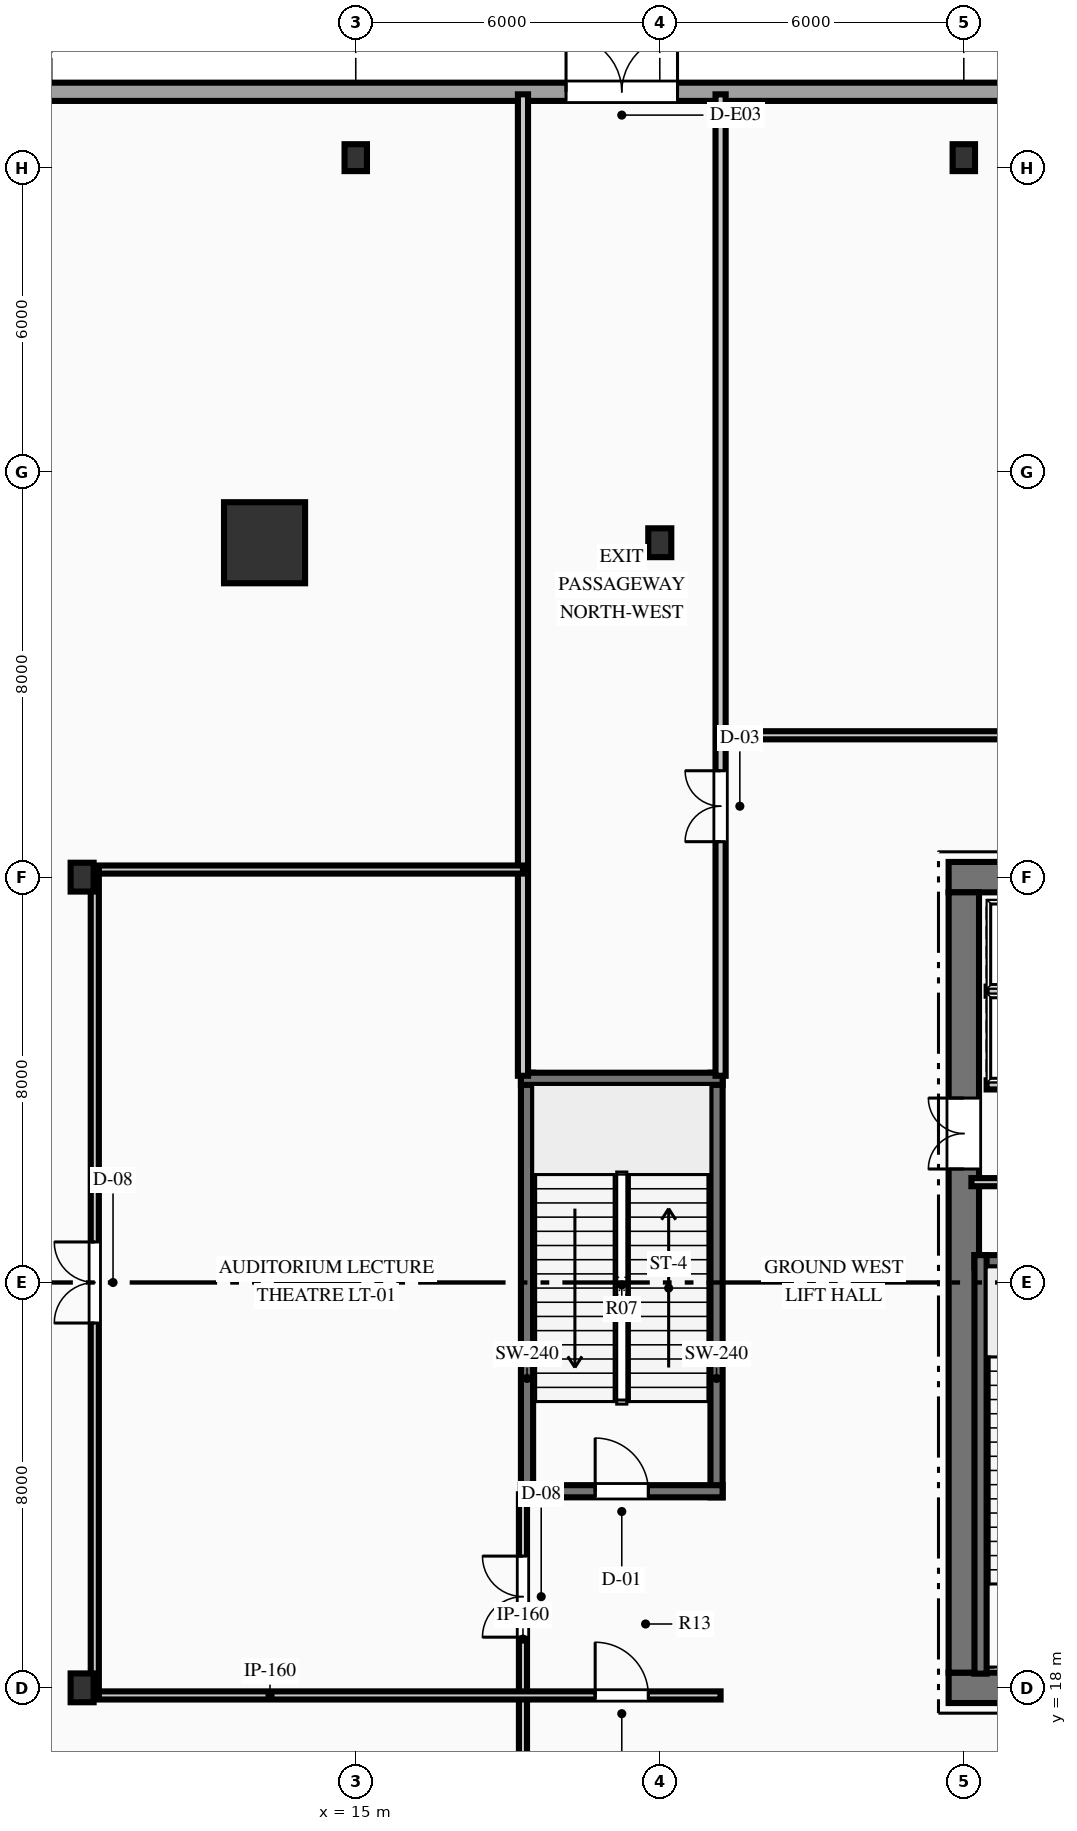
"""IFC4 building model, lengths in metres.
Left out: names, types, materials, properties, quantities, classifications, styles, units other than length and angle.
Written with IfcOpenShell. Run it as: python <this file> out.ifc"""

import sys

from ifc_helpers import new_model, si_unit, direction, frame, frame_2d, origin, origin_2d, place, context, subcontext, project, spatial, rectangle, hollow_rectangle, i_section, extrude, element, fill, save


model = new_model("IFC4")
c1 = context("Model", 3, precision=1e-05, world=origin(), true_north=direction((0.0, 1.0)))
c2 = subcontext(c1, "Body", "Model", "MODEL_VIEW")
j1 = project(units=[si_unit("LENGTHUNIT", "METRE"), si_unit("PLANEANGLEUNIT", "RADIAN")], contexts=[c1])
p1 = place(None, origin())
s1 = spatial("IfcSite", under=j1, at=p1, CompositionType="ELEMENT")
p2 = place(p1, origin())
s2 = spatial("IfcBuilding", under=s1, at=p2, CompositionType="ELEMENT")
p3 = place(p2, origin())
s3 = spatial("IfcBuildingStorey", under=s2, at=p3, CompositionType="ELEMENT", Elevation=0.0)
p4 = place(p3, frame((26.7, 18.0, 0.0), z_axis=(0.0, 0.0, 1.0), x_axis=(1.0, 0.0, 0.0)))
e1 = element("IfcWall", 1, at=p4, inside=s3, PredefinedType="SHEAR", context=c2, shape_type="SweptSolid", body=[
    extrude(rectangle(XDim=18.6, YDim=0.6, at=frame_2d((9.3, 0.0))), origin(), (0.0, 0.0, 1.0), 6.0),
])
p5 = place(p4, frame((7.4, 0.0, 0.0)))
e2 = element("IfcOpeningElement", 2, at=p5, cuts=e1, PredefinedType="OPENING", context=c2, shape_type="SweptSolid", body=[
    extrude(rectangle(XDim=1.1, YDim=2.15, at=frame_2d((0.55, 1.075))), frame((0.0, 0.31, 0.0), z_axis=(0.0, -1.0, 0.0), x_axis=(1.0, 0.0, 0.0)), (0.0, 0.0, 1.0), 0.62),
])
p6 = place(p4, frame((10.1, 0.0, 0.0)))
e3 = element("IfcOpeningElement", 3, at=p6, cuts=e1, PredefinedType="OPENING", context=c2, shape_type="SweptSolid", body=[
    extrude(rectangle(XDim=1.1, YDim=2.15, at=frame_2d((0.55, 1.075))), frame((0.0, 0.31, 0.0), z_axis=(0.0, -1.0, 0.0), x_axis=(1.0, 0.0, 0.0)), (0.0, 0.0, 1.0), 0.62),
])
p7 = place(p3, frame((26.7, 34.0, 0.0), z_axis=(0.0, 0.0, 1.0), x_axis=(1.0, 0.0, 0.0)))
e4 = element("IfcWall", 4, at=p7, inside=s3, PredefinedType="SHEAR", context=c2, shape_type="SweptSolid", body=[
    extrude(rectangle(XDim=18.6, YDim=0.6, at=frame_2d((9.3, 0.0))), origin(), (0.0, 0.0, 1.0), 6.0),
])
p8 = place(p7, frame((5.595, 0.0, 0.0)))
e5 = element("IfcOpeningElement", 5, at=p8, cuts=e4, PredefinedType="OPENING", context=c2, shape_type="SweptSolid", body=[
    extrude(rectangle(XDim=1.05, YDim=2.15, at=frame_2d((0.525, 1.075))), frame((0.0, 0.31, 0.0), z_axis=(0.0, -1.0, 0.0), x_axis=(1.0, 0.0, 0.0)), (0.0, 0.0, 1.0), 0.62),
])
p9 = place(p7, frame((1.265, 0.0, 0.0)))
e6 = element("IfcOpeningElement", 6, at=p9, cuts=e4, PredefinedType="OPENING", context=c2, shape_type="SweptSolid", body=[
    extrude(rectangle(XDim=1.1, YDim=2.15, at=frame_2d((0.55, 1.075))), frame((0.0, 0.31, 0.0), z_axis=(0.0, -1.0, 0.0), x_axis=(1.0, 0.0, 0.0)), (0.0, 0.0, 1.0), 0.62),
])
p10 = place(p7, frame((3.515, 0.0, 0.0)))
e7 = element("IfcOpeningElement", 7, at=p10, cuts=e4, PredefinedType="OPENING", context=c2, shape_type="SweptSolid", body=[
    extrude(rectangle(XDim=1.1, YDim=2.15, at=frame_2d((0.55, 1.075))), frame((0.0, 0.31, 0.0), z_axis=(0.0, -1.0, 0.0), x_axis=(1.0, 0.0, 0.0)), (0.0, 0.0, 1.0), 0.62),
])
p11 = place(p7, frame((13.985, 0.0, 0.0)))
e8 = element("IfcOpeningElement", 8, at=p11, cuts=e4, PredefinedType="OPENING", context=c2, shape_type="SweptSolid", body=[
    extrude(rectangle(XDim=1.1, YDim=2.15, at=frame_2d((0.55, 1.075))), frame((0.0, 0.31, 0.0), z_axis=(0.0, -1.0, 0.0), x_axis=(1.0, 0.0, 0.0)), (0.0, 0.0, 1.0), 0.62),
])
p12 = place(p7, frame((16.235, 0.0, 0.0)))
e9 = element("IfcOpeningElement", 9, at=p12, cuts=e4, PredefinedType="OPENING", context=c2, shape_type="SweptSolid", body=[
    extrude(rectangle(XDim=1.1, YDim=2.15, at=frame_2d((0.55, 1.075))), frame((0.0, 0.31, 0.0), z_axis=(0.0, -1.0, 0.0), x_axis=(1.0, 0.0, 0.0)), (0.0, 0.0, 1.0), 0.62),
])
p13 = place(p3, frame((27.0, 18.3, 0.0), z_axis=(0.0, 0.0, 1.0), x_axis=(0.0, 1.0, 0.0)))
e10 = element("IfcWall", 10, at=p13, inside=s3, PredefinedType="SHEAR", context=c2, shape_type="SweptSolid", body=[
    extrude(rectangle(XDim=15.4, YDim=0.6, at=frame_2d((7.7, 0.0))), origin(), (0.0, 0.0, 1.0), 6.0),
])
p14 = place(p13, frame((9.94, 0.0, 0.0)))
e11 = element("IfcOpeningElement", 11, at=p14, cuts=e10, PredefinedType="OPENING", context=c2, shape_type="SweptSolid", body=[
    extrude(rectangle(XDim=1.4, YDim=2.2, at=frame_2d((0.7, 1.1))), frame((0.0, 0.31, 0.0), z_axis=(0.0, -1.0, 0.0), x_axis=(1.0, 0.0, 0.0)), (0.0, 0.0, 1.0), 0.62),
])
p15 = place(p3, frame((27.21, 26.42, 0.0), z_axis=(0.0, 0.0, 1.0), x_axis=(1.0, 0.0, 0.0)))
e12 = element("IfcWall", 12, at=p15, inside=s3, PredefinedType="SHEAR", context=c2, shape_type="SweptSolid", body=[
    extrude(rectangle(XDim=3.98, YDim=0.24, at=frame_2d((1.99, 0.0))), origin(), (0.0, 0.0, 1.0), 6.0),
])
p16 = place(p3, frame((27.33, 18.28, 0.0), z_axis=(0.0, 0.0, 1.0), x_axis=(0.0, 1.0, 0.0)))
e13 = element("IfcWall", 13, at=p16, inside=s3, PredefinedType="SHEAR", context=c2, shape_type="SweptSolid", body=[
    extrude(rectangle(XDim=8.26, YDim=0.24, at=frame_2d((4.13, 0.0))), origin(), (0.0, 0.0, 1.0), 6.0),
])
for number, where, z_axis, x_axis in (
    (14, (18.38, 21.76, 0.0), (0.0, 0.0, 1.0), (0.0, 1.0, 0.0)),
    (15, (22.12, 21.76, 0.0), (0.0, 0.0, 1.0), (0.0, 1.0, 0.0)),
):
    element("IfcWall", number, at=place(p3, frame(where, z_axis=z_axis, x_axis=x_axis)), inside=s3, PredefinedType="SHEAR", context=c2, shape_type="SweptSolid", body=[
        extrude(rectangle(XDim=8.38, YDim=0.24, at=frame_2d((4.19, 0.0))), origin(), (0.0, 0.0, 1.0), 6.0),
    ])
p17 = place(p3, frame((18.26, 21.88, 0.0), z_axis=(0.0, 0.0, 1.0), x_axis=(1.0, 0.0, 0.0)))
e16 = element("IfcWall", 16, at=p17, inside=s3, PredefinedType="SHEAR", context=c2, shape_type="SweptSolid", body=[
    extrude(rectangle(XDim=3.98, YDim=0.24, at=frame_2d((1.99, 0.0))), origin(), (0.0, 0.0, 1.0), 6.0),
])
p18 = place(p17, frame((1.465, 0.0, 0.0)))
e17 = element("IfcOpeningElement", 17, at=p18, cuts=e16, PredefinedType="OPENING", context=c2, shape_type="SweptSolid", body=[
    extrude(rectangle(XDim=1.05, YDim=2.15, at=frame_2d((0.525, 1.075))), frame((0.0, 0.13, 0.0), z_axis=(0.0, -1.0, 0.0), x_axis=(1.0, 0.0, 0.0)), (0.0, 0.0, 1.0), 0.26),
])
p19 = place(p3, frame((18.26, 30.02, 0.0), z_axis=(0.0, 0.0, 1.0), x_axis=(1.0, 0.0, 0.0)))
e18 = element("IfcWall", 18, at=p19, inside=s3, PredefinedType="SHEAR", context=c2, shape_type="SweptSolid", body=[
    extrude(rectangle(XDim=3.98, YDim=0.24, at=frame_2d((1.99, 0.0))), origin(), (0.0, 0.0, 1.0), 6.0),
])
p20 = place(p3, frame((13.2, 40.6, 0.0), z_axis=(0.0, 0.0, 1.0), x_axis=(1.0, 0.0, 0.0)))
e19 = element("IfcColumn", 19, at=p20, inside=s3, PredefinedType="COLUMN", context=c2, shape_type="SweptSolid", body=[
    extrude(hollow_rectangle(XDim=1.6, YDim=1.6, WallThickness=0.08, at=origin_2d()), origin(), (0.0, 0.0, 1.0), 6.0),
])
for number, where, z_axis, x_axis in (
    (20, (9.6, 18.0, 0.0), (0.0, 0.0, 1.0), (1.0, 0.0, 0.0)),
    (21, (9.6, 34.0, 0.0), (0.0, 0.0, 1.0), (1.0, 0.0, 0.0)),
    (22, (21.0, 40.6, 0.0), (0.0, 0.0, 1.0), (1.0, 0.0, 0.0)),
):
    element("IfcColumn", number, at=place(p3, frame(where, z_axis=z_axis, x_axis=x_axis)), inside=s3, PredefinedType="COLUMN", context=c2, shape_type="SweptSolid", body=[
        extrude(i_section(OverallWidth=0.454, OverallDepth=0.569, WebThickness=0.078, FlangeThickness=0.125, at=origin_2d()), origin(), (0.0, 0.0, 1.0), 6.0),
    ])
for number, where, z_axis, x_axis in (
    (23, (27.0, 48.2, 0.0), (0.0, 0.0, 1.0), (1.0, 0.0, 0.0)),
    (24, (15.0, 48.2, 0.0), (0.0, 0.0, 1.0), (1.0, 0.0, 0.0)),
):
    element("IfcColumn", number, at=place(p3, frame(where, z_axis=z_axis, x_axis=x_axis)), inside=s3, PredefinedType="PILASTER", context=c2, shape_type="SweptSolid", body=[
        extrude(i_section(OverallWidth=0.442, OverallDepth=0.531, WebThickness=0.066, FlangeThickness=0.106, at=origin_2d()), origin(), (0.0, 0.0, 1.0), 6.0),
    ])
p21 = place(p3, frame((8.0, 49.5, 0.0), z_axis=(0.0, 0.0, 1.0), x_axis=(1.0, 0.0, 0.0)))
e25 = element("IfcWall", 25, at=p21, inside=s3, PredefinedType="STANDARD", context=c2, shape_type="SweptSolid", body=[
    extrude(rectangle(XDim=56.0, YDim=0.36, at=frame_2d((28.0, 0.0))), origin(), (0.0, 0.0, 1.0), 5.67),
])
p22 = place(p21, frame((11.15, 0.0, 0.0)))
e26 = element("IfcOpeningElement", 26, at=p22, cuts=e25, PredefinedType="OPENING", context=c2, shape_type="SweptSolid", body=[
    extrude(rectangle(XDim=2.2, YDim=2.4, at=frame_2d((1.1, 1.2))), frame((0.0, 0.19, 0.0), z_axis=(0.0, -1.0, 0.0), x_axis=(1.0, 0.0, 0.0)), (0.0, 0.0, 1.0), 0.38),
])
p23 = place(p21, frame((42.65, 0.0, 0.0)))
e27 = element("IfcOpeningElement", 27, at=p23, cuts=e25, PredefinedType="OPENING", context=c2, shape_type="SweptSolid", body=[
    extrude(rectangle(XDim=2.2, YDim=2.4, at=frame_2d((1.1, 1.2))), frame((0.0, 0.19, 0.0), z_axis=(0.0, -1.0, 0.0), x_axis=(1.0, 0.0, 0.0)), (0.0, 0.0, 1.0), 0.38),
])
p24 = place(p21, frame((26.8, 0.0, 0.0)))
e28 = element("IfcOpeningElement", 28, at=p24, cuts=e25, PredefinedType="OPENING", context=c2, shape_type="SweptSolid", body=[
    extrude(rectangle(XDim=2.4, YDim=2.6, at=frame_2d((1.2, 1.3))), frame((0.0, 0.19, 0.0), z_axis=(0.0, -1.0, 0.0), x_axis=(1.0, 0.0, 0.0)), (0.0, 0.0, 1.0), 0.38),
])
p25 = place(p21, frame((50.55, 0.0, 0.0)))
e29 = element("IfcOpeningElement", 29, at=p25, cuts=e25, PredefinedType="OPENING", context=c2, shape_type="SweptSolid", body=[
    extrude(rectangle(XDim=1.1, YDim=2.2, at=frame_2d((0.55, 1.1))), frame((0.0, 0.19, 0.0), z_axis=(0.0, -1.0, 0.0), x_axis=(1.0, 0.0, 0.0)), (0.0, 0.0, 1.0), 0.38),
])
p26 = place(p3, frame((27.15, 27.98, 0.0), z_axis=(0.0, 0.0, 1.0), x_axis=(1.0, 0.0, 0.0)))
e30 = element("IfcWall", 30, at=p26, inside=s3, PredefinedType="PARTITIONING", context=c2, shape_type="SweptSolid", body=[
    extrude(rectangle(XDim=4.05, YDim=0.16, at=frame_2d((2.025, 0.0))), origin(), (0.0, 0.0, 1.0), 5.67),
])
p27 = place(p26, frame((1.625, 0.0, 0.0)))
e31 = element("IfcOpeningElement", 31, at=p27, cuts=e30, PredefinedType="OPENING", context=c2, shape_type="SweptSolid", body=[
    extrude(rectangle(XDim=0.95, YDim=2.15, at=frame_2d((0.475, 1.075))), frame((0.0, 0.09, 0.0), z_axis=(0.0, -1.0, 0.0), x_axis=(1.0, 0.0, 0.0)), (0.0, 0.0, 1.0), 0.18),
])
p28 = place(p3, frame((27.45, 29.9, 0.0), z_axis=(0.0, 0.0, 1.0), x_axis=(1.0, 0.0, 0.0)))
e32 = element("IfcWall", 32, at=p28, inside=s3, PredefinedType="PARTITIONING", context=c2, shape_type="SweptSolid", body=[
    extrude(rectangle(XDim=4.43, YDim=0.18, at=frame_2d((2.215, 0.0))), origin(), (0.0, 0.0, 1.0), 5.67),
])
p29 = place(p28, frame((0.515, 0.0, 0.0)))
e33 = element("IfcOpeningElement", 33, at=p29, cuts=e32, PredefinedType="OPENING", context=c2, shape_type="SweptSolid", body=[
    extrude(rectangle(XDim=1.1, YDim=2.15, at=frame_2d((0.55, 1.075))), frame((0.0, 0.1, 0.0), z_axis=(0.0, -1.0, 0.0), x_axis=(1.0, 0.0, 0.0)), (0.0, 0.0, 1.0), 0.2),
])
p30 = place(p28, frame((2.765, 0.0, 0.0)))
e34 = element("IfcOpeningElement", 34, at=p30, cuts=e32, PredefinedType="OPENING", context=c2, shape_type="SweptSolid", body=[
    extrude(rectangle(XDim=1.1, YDim=2.15, at=frame_2d((0.55, 1.075))), frame((0.0, 0.1, 0.0), z_axis=(0.0, -1.0, 0.0), x_axis=(1.0, 0.0, 0.0)), (0.0, 0.0, 1.0), 0.2),
])
p31 = place(p3, frame((27.45, 31.75, 0.0), z_axis=(0.0, 0.0, 1.0), x_axis=(1.0, 0.0, 0.0)))
e35 = element("IfcWall", 35, at=p31, inside=s3, PredefinedType="PARTITIONING", context=c2, shape_type="SweptSolid", body=[
    extrude(rectangle(XDim=4.43, YDim=0.18, at=frame_2d((2.215, 0.0))), origin(), (0.0, 0.0, 1.0), 5.67),
])
p32 = place(p3, frame((18.3, 30.08, 0.0), z_axis=(0.0, 0.0, 1.0), x_axis=(0.0, 1.0, 0.0)))
e36 = element("IfcWall", 36, at=p32, inside=s3, PredefinedType="PARTITIONING", context=c2, shape_type="SweptSolid", body=[
    extrude(rectangle(XDim=19.37, YDim=0.2, at=frame_2d((9.685, 0.0))), origin(), (0.0, 0.0, 1.0), 5.67),
])
p33 = place(p3, frame((22.2, 30.08, 0.0), z_axis=(0.0, 0.0, 1.0), x_axis=(0.0, 1.0, 0.0)))
e37 = element("IfcWall", 37, at=p33, inside=s3, PredefinedType="PARTITIONING", context=c2, shape_type="SweptSolid", body=[
    extrude(rectangle(XDim=19.37, YDim=0.2, at=frame_2d((9.685, 0.0))), origin(), (0.0, 0.0, 1.0), 5.67),
])
p34 = place(p33, frame((4.62, 0.0, 0.0)))
e38 = element("IfcOpeningElement", 38, at=p34, cuts=e37, PredefinedType="OPENING", context=c2, shape_type="SweptSolid", body=[
    extrude(rectangle(XDim=1.4, YDim=2.2, at=frame_2d((0.7, 1.1))), frame((0.0, 0.11, 0.0), z_axis=(0.0, -1.0, 0.0), x_axis=(1.0, 0.0, 0.0)), (0.0, 0.0, 1.0), 0.22),
])
p35 = place(p3, frame((18.3, 15.2, 0.0), z_axis=(0.0, 0.0, 1.0), x_axis=(0.0, 1.0, 0.0)))
e39 = element("IfcWall", 39, at=p35, inside=s3, PredefinedType="PARTITIONING", context=c2, shape_type="SweptSolid", body=[
    extrude(rectangle(XDim=2.65, YDim=0.16, at=frame_2d((1.325, 0.0))), origin(), (0.0, 0.0, 1.0), 5.67),
])
p36 = place(p3, frame((18.3, 17.85, 0.0), z_axis=(0.0, 0.0, 1.0), x_axis=(0.0, 1.0, 0.0)))
e40 = element("IfcWall", 40, at=p36, inside=s3, PredefinedType="PARTITIONING", context=c2, shape_type="SweptSolid", body=[
    extrude(rectangle(XDim=3.97, YDim=0.16, at=frame_2d((1.985, 0.0))), origin(), (0.0, 0.0, 1.0), 5.67),
])
p37 = place(p36, frame((1.15, 0.0, 0.0)))
e41 = element("IfcOpeningElement", 41, at=p37, cuts=e40, PredefinedType="OPENING", context=c2, shape_type="SweptSolid", body=[
    extrude(rectangle(XDim=1.6, YDim=2.2, at=frame_2d((0.8, 1.1))), frame((0.0, 0.09, 0.0), z_axis=(0.0, -1.0, 0.0), x_axis=(1.0, 0.0, 0.0)), (0.0, 0.0, 1.0), 0.18),
])
p38 = place(p3, frame((9.85, 17.85, 0.0), z_axis=(0.0, 0.0, 1.0), x_axis=(1.0, 0.0, 0.0)))
e42 = element("IfcWall", 42, at=p38, inside=s3, PredefinedType="PARTITIONING", context=c2, shape_type="SweptSolid", body=[
    extrude(rectangle(XDim=12.35, YDim=0.16, at=frame_2d((6.175, 0.0))), origin(), (0.0, 0.0, 1.0), 4.803),
])
p39 = place(p38, frame((9.875, 0.0, 0.0)))
e43 = element("IfcOpeningElement", 43, at=p39, cuts=e42, PredefinedType="OPENING", context=c2, shape_type="SweptSolid", body=[
    extrude(rectangle(XDim=1.05, YDim=2.15, at=frame_2d((0.525, 1.075))), frame((0.0, 0.09, 0.0), z_axis=(0.0, -1.0, 0.0), x_axis=(1.0, 0.0, 0.0)), (0.0, 0.0, 1.0), 0.18),
])
p40 = place(p3, frame((9.85, 34.15, 0.0), z_axis=(0.0, 0.0, 1.0), x_axis=(1.0, 0.0, 0.0)))
e44 = element("IfcWall", 44, at=p40, inside=s3, PredefinedType="PARTITIONING", context=c2, shape_type="SweptSolid", body=[
    extrude(rectangle(XDim=8.45, YDim=0.16, at=frame_2d((4.225, 0.0))), origin(), (0.0, 0.0, 1.0), 4.803),
])
p41 = place(p3, frame((9.85, 17.85, 0.0), z_axis=(0.0, 0.0, 1.0), x_axis=(0.0, 1.0, 0.0)))
e45 = element("IfcWall", 45, at=p41, inside=s3, PredefinedType="PARTITIONING", context=c2, shape_type="SweptSolid", body=[
    extrude(rectangle(XDim=16.3, YDim=0.16, at=frame_2d((8.15, 0.0))), origin(), (0.0, 0.0, 1.0), 4.803),
])
p42 = place(p41, frame((7.35, 0.0, 0.0)))
e46 = element("IfcOpeningElement", 46, at=p42, cuts=e45, PredefinedType="OPENING", context=c2, shape_type="SweptSolid", body=[
    extrude(rectangle(XDim=1.6, YDim=2.2, at=frame_2d((0.8, 1.1))), frame((0.0, 0.09, 0.0), z_axis=(0.0, -1.0, 0.0), x_axis=(1.0, 0.0, 0.0)), (0.0, 0.0, 1.0), 0.18),
])
p43 = place(p3, frame((22.2, 36.8, 0.0), z_axis=(0.0, 0.0, 1.0), x_axis=(1.0, 0.0, 0.0)))
e47 = element("IfcWall", 47, at=p43, inside=s3, PredefinedType="PARTITIONING", context=c2, shape_type="SweptSolid", body=[
    extrude(rectangle(XDim=23.22, YDim=0.16, at=frame_2d((11.61, 0.0))), origin(), (0.0, 0.0, 1.0), 5.67),
])
p44 = place(p43, frame((7.0, 0.0, 0.0)))
e48 = element("IfcOpeningElement", 48, at=p44, cuts=e47, PredefinedType="OPENING", context=c2, shape_type="SweptSolid", body=[
    extrude(rectangle(XDim=1.6, YDim=2.2, at=frame_2d((0.8, 1.1))), frame((0.0, 0.09, 0.0), z_axis=(0.0, -1.0, 0.0), x_axis=(1.0, 0.0, 0.0)), (0.0, 0.0, 1.0), 0.18),
])
p45 = place(p22, origin())
e49 = element("IfcDoor", 49, at=p45, inside=s3, OperationType="DOUBLE_DOOR_SINGLE_SWING", PredefinedType="DOOR", context=c2, shape_type="SweptSolid", body=[
    extrude(rectangle(XDim=2.2, YDim=2.4, at=frame_2d((1.1, 1.2))), frame((0.0, 0.025, 0.0), z_axis=(0.0, -1.0, 0.0), x_axis=(1.0, 0.0, 0.0)), (0.0, 0.0, 1.0), 0.05),
])
fill(e26, e49)
p46 = place(p14, origin())
e50 = element("IfcDoor", 50, at=p46, inside=s3, OperationType="DOUBLE_DOOR_SINGLE_SWING", PredefinedType="DOOR", context=c2, shape_type="SweptSolid", body=[
    extrude(rectangle(XDim=1.4, YDim=2.2, at=frame_2d((0.7, 1.1))), frame((0.0, 0.025, 0.0), z_axis=(0.0, -1.0, 0.0), x_axis=(1.0, 0.0, 0.0)), (0.0, 0.0, 1.0), 0.05),
])
fill(e11, e50)
p47 = place(p18, origin())
e51 = element("IfcDoor", 51, at=p47, inside=s3, OperationType="SINGLE_SWING_LEFT", PredefinedType="DOOR", context=c2, shape_type="SweptSolid", body=[
    extrude(rectangle(XDim=1.05, YDim=2.15, at=frame_2d((0.525, 1.075))), frame((0.0, 0.025, 0.0), z_axis=(0.0, -1.0, 0.0), x_axis=(1.0, 0.0, 0.0)), (0.0, 0.0, 1.0), 0.05),
])
fill(e17, e51)
p48 = place(p39, origin())
e52 = element("IfcDoor", 52, at=p48, inside=s3, OperationType="SINGLE_SWING_LEFT", PredefinedType="DOOR", context=c2, shape_type="SweptSolid", body=[
    extrude(rectangle(XDim=1.05, YDim=2.15, at=frame_2d((0.525, 1.075))), frame((0.0, 0.025, 0.0), z_axis=(0.0, -1.0, 0.0), x_axis=(1.0, 0.0, 0.0)), (0.0, 0.0, 1.0), 0.05),
])
fill(e43, e52)
p49 = place(p34, origin())
e53 = element("IfcDoor", 53, at=p49, inside=s3, OperationType="DOUBLE_DOOR_SINGLE_SWING", PredefinedType="DOOR", context=c2, shape_type="SweptSolid", body=[
    extrude(rectangle(XDim=1.4, YDim=2.2, at=frame_2d((0.7, 1.1))), frame((0.0, 0.025, 0.0), z_axis=(0.0, -1.0, 0.0), x_axis=(1.0, 0.0, 0.0)), (0.0, 0.0, 1.0), 0.05),
])
fill(e38, e53)
p50 = place(p37, origin())
e54 = element("IfcDoor", 54, at=p50, inside=s3, OperationType="DOUBLE_DOOR_SINGLE_SWING", PredefinedType="DOOR", context=c2, shape_type="SweptSolid", body=[
    extrude(rectangle(XDim=1.6, YDim=2.2, at=frame_2d((0.8, 1.1))), frame((0.0, 0.025, 0.0), z_axis=(0.0, -1.0, 0.0), x_axis=(1.0, 0.0, 0.0)), (0.0, 0.0, 1.0), 0.05),
])
fill(e41, e54)
p51 = place(p42, origin())
e55 = element("IfcDoor", 55, at=p51, inside=s3, OperationType="DOUBLE_DOOR_SINGLE_SWING", PredefinedType="DOOR", context=c2, shape_type="SweptSolid", body=[
    extrude(rectangle(XDim=1.6, YDim=2.2, at=frame_2d((0.8, 1.1))), frame((0.0, 0.025, 0.0), z_axis=(0.0, -1.0, 0.0), x_axis=(1.0, 0.0, 0.0)), (0.0, 0.0, 1.0), 0.05),
])
fill(e46, e55)
save(model, sys.argv[1])
